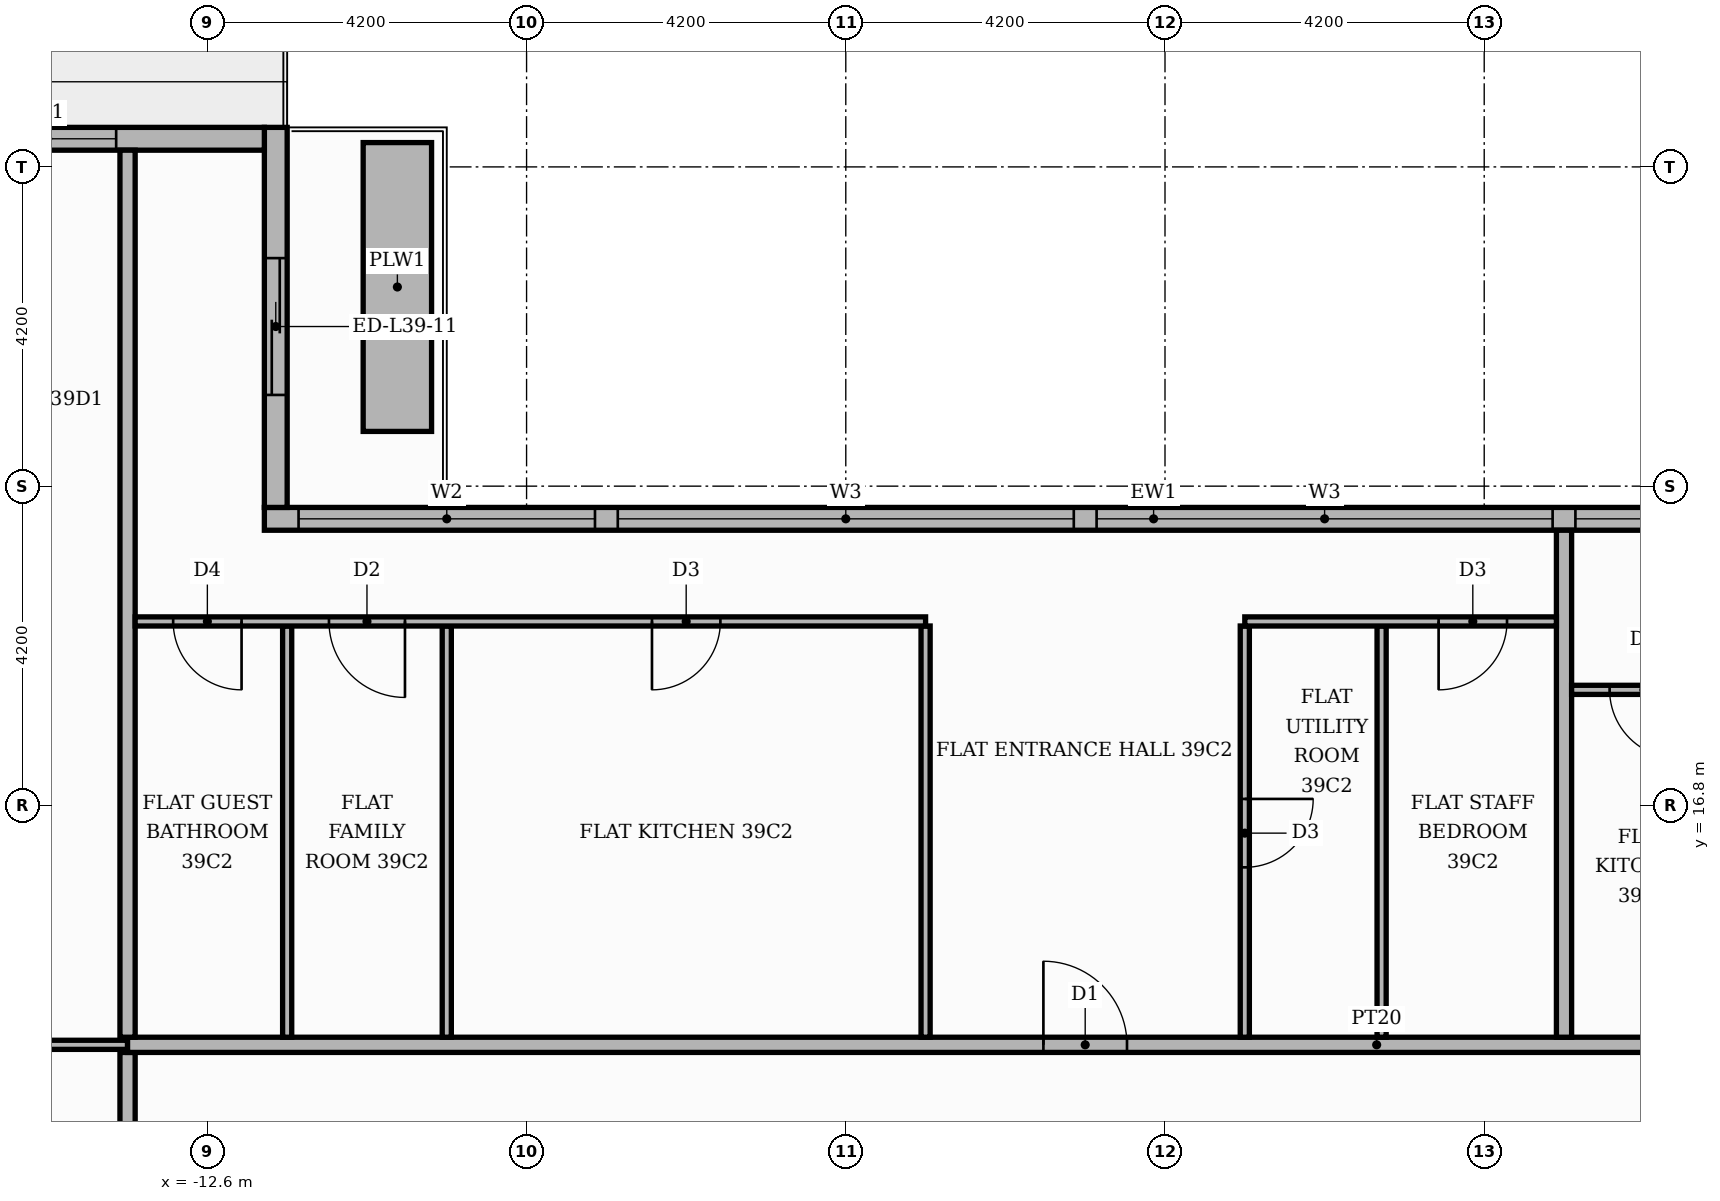
"""IFC4 building model, lengths in metres.
Left out: names, types, materials, properties, quantities, classifications, styles, units other than length and angle.
Written with IfcOpenShell. Run it as: python <this file> out.ifc"""

import sys

from ifc_helpers import new_model, si_unit, direction, frame, frame_2d, origin, place, context, subcontext, project, spatial, rectangle, extrude, element, fill, save


model = new_model("IFC4")
c1 = context("Model", 3, precision=1e-05, world=origin(), true_north=direction((0.0, 1.0)))
c2 = subcontext(c1, "Body", "Model", "MODEL_VIEW")
j1 = project(units=[si_unit("LENGTHUNIT", "METRE"), si_unit("PLANEANGLEUNIT", "RADIAN")], contexts=[c1])
p1 = place(None, origin())
s1 = spatial("IfcSite", under=j1, at=p1, CompositionType="ELEMENT")
p2 = place(p1, origin())
s2 = spatial("IfcBuilding", under=s1, at=p2, CompositionType="ELEMENT")
p3 = place(p2, frame((0.0, 0.0, 165.0)))
s3 = spatial("IfcBuildingStorey", under=s2, at=p3, CompositionType="ELEMENT", Elevation=165.0)
p4 = place(p3, frame((11.55, 20.57, 0.0), z_axis=(0.0, 0.0, 1.0), x_axis=(-1.0, 0.0, 0.0)))
e1 = element("IfcWall", 1, at=p4, inside=s3, PredefinedType="STANDARD", context=c2, shape_type="SweptSolid", body=[
    extrude(rectangle(XDim=23.4, YDim=0.3, at=frame_2d((11.7, 0.0))), origin(), (0.0, 0.0, 1.0), 3.48),
])
p5 = place(p4, frame((0.15, 0.0, 0.9)))
e2 = element("IfcOpeningElement", 2, at=p5, cuts=e1, PredefinedType="OPENING", context=c2, shape_type="SweptSolid", body=[
    extrude(rectangle(XDim=6.0, YDim=2.1, at=frame_2d((3.0, 1.05))), frame((0.0, 0.16, 0.0), z_axis=(0.0, -1.0, 0.0), x_axis=(1.0, 0.0, 0.0)), (0.0, 0.0, 1.0), 0.32),
])
p6 = place(p4, frame((6.45, 0.0, 0.9)))
e3 = element("IfcOpeningElement", 3, at=p6, cuts=e1, PredefinedType="OPENING", context=c2, shape_type="SweptSolid", body=[
    extrude(rectangle(XDim=6.0, YDim=2.1, at=frame_2d((3.0, 1.05))), frame((0.0, 0.16, 0.0), z_axis=(0.0, -1.0, 0.0), x_axis=(1.0, 0.0, 0.0)), (0.0, 0.0, 1.0), 0.32),
])
p7 = place(p4, frame((12.75, 0.0, 0.9)))
e4 = element("IfcOpeningElement", 4, at=p7, cuts=e1, PredefinedType="OPENING", context=c2, shape_type="SweptSolid", body=[
    extrude(rectangle(XDim=6.0, YDim=2.1, at=frame_2d((3.0, 1.05))), frame((0.0, 0.16, 0.0), z_axis=(0.0, -1.0, 0.0), x_axis=(1.0, 0.0, 0.0)), (0.0, 0.0, 1.0), 0.32),
])
p8 = place(p4, frame((19.05, 0.0, 0.9)))
e5 = element("IfcOpeningElement", 5, at=p8, cuts=e1, PredefinedType="OPENING", context=c2, shape_type="SweptSolid", body=[
    extrude(rectangle(XDim=3.9, YDim=2.1, at=frame_2d((1.95, 1.05))), frame((0.0, 0.16, 0.0), z_axis=(0.0, -1.0, 0.0), x_axis=(1.0, 0.0, 0.0)), (0.0, 0.0, 1.0), 0.32),
])
p9 = place(p3, frame((-11.7, 20.72, 0.0), z_axis=(0.0, 0.0, 1.0), x_axis=(0.0, 1.0, 0.0)))
e6 = element("IfcWall", 6, at=p9, inside=s3, PredefinedType="STANDARD", context=c2, shape_type="SweptSolid", body=[
    extrude(rectangle(XDim=5.0, YDim=0.3, at=frame_2d((2.5, 0.0))), origin(), (0.0, 0.0, 1.0), 3.48),
])
p10 = place(p9, frame((1.48, 0.0, 0.0)))
e7 = element("IfcOpeningElement", 7, at=p10, cuts=e6, PredefinedType="OPENING", context=c2, shape_type="SweptSolid", body=[
    extrude(rectangle(XDim=1.8, YDim=2.4, at=frame_2d((0.9, 1.2))), frame((0.0, 0.16, 0.0), z_axis=(0.0, -1.0, 0.0), x_axis=(1.0, 0.0, 0.0)), (0.0, 0.0, 1.0), 0.32),
])
p11 = place(p3, frame((-11.85, 25.57, 0.0), z_axis=(0.0, 0.0, 1.0), x_axis=(-1.0, 0.0, 0.0)))
e8 = element("IfcWall", 8, at=p11, inside=s3, PredefinedType="STANDARD", context=c2, shape_type="SweptSolid", body=[
    extrude(rectangle(XDim=4.35, YDim=0.3, at=frame_2d((2.175, 0.0))), origin(), (0.0, 0.0, 1.0), 3.48),
])
p12 = place(p11, frame((1.95, 0.0, 0.9)))
e9 = element("IfcOpeningElement", 9, at=p12, cuts=e8, PredefinedType="OPENING", context=c2, shape_type="SweptSolid", body=[
    extrude(rectangle(XDim=1.8, YDim=2.1, at=frame_2d((0.9, 1.05))), frame((0.0, 0.16, 0.0), z_axis=(0.0, -1.0, 0.0), x_axis=(1.0, 0.0, 0.0)), (0.0, 0.0, 1.0), 0.32),
])
p13 = place(p3, frame((-10.1, 21.72, 0.0), z_axis=(0.0, 0.0, 1.0), x_axis=(0.0, 1.0, 0.0)))
e10 = element("IfcWall", 10, at=p13, inside=s3, PredefinedType="MOVABLE", context=c2, shape_type="SweptSolid", body=[
    extrude(rectangle(XDim=3.8, YDim=0.9, at=frame_2d((1.9, 0.0))), origin(), (0.0, 0.0, 1.0), 0.6),
])
p14 = place(p3, frame((-13.65, 11.1, 0.0), z_axis=(0.0, 0.0, 1.0), x_axis=(0.0, 1.0, 0.0)))
e11 = element("IfcWall", 11, at=p14, inside=s3, PredefinedType="PARTITIONING", context=c2, shape_type="SweptSolid", body=[
    extrude(rectangle(XDim=2.45, YDim=0.2, at=frame_2d((1.225, 0.0))), origin(), (0.0, 0.0, 1.0), 3.48),
])
p15 = place(p3, frame((-19.82, 13.65, 0.0), z_axis=(0.0, 0.0, 1.0), x_axis=(1.0, 0.0, 0.0)))
e12 = element("IfcWall", 12, at=p15, inside=s3, PredefinedType="PARTITIONING", context=c2, shape_type="SweptSolid", body=[
    extrude(rectangle(XDim=6.17, YDim=0.12, at=frame_2d((3.085, 0.0))), origin(), (0.0, 0.0, 1.0), 3.48),
])
p16 = place(p15, frame((2.635, 0.0, 0.0)))
e13 = element("IfcOpeningElement", 13, at=p16, cuts=e12, PredefinedType="OPENING", context=c2, shape_type="SweptSolid", body=[
    extrude(rectangle(XDim=0.9, YDim=2.1, at=frame_2d((0.45, 1.05))), frame((0.0, 0.07, 0.0), z_axis=(0.0, -1.0, 0.0), x_axis=(1.0, 0.0, 0.0)), (0.0, 0.0, 1.0), 0.14),
])
p17 = place(p3, frame((-13.65, 13.65, 0.0), z_axis=(0.0, 0.0, 1.0), x_axis=(1.0, 0.0, 0.0)))
e14 = element("IfcWall", 14, at=p17, inside=s3, PredefinedType="PARTITIONING", context=c2, shape_type="SweptSolid", body=[
    extrude(rectangle(XDim=32.87, YDim=0.2, at=frame_2d((16.435, 0.0))), origin(), (0.0, 0.0, 1.0), 3.48),
])
p18 = place(p17, frame((24.65, 0.0, 0.0)))
e15 = element("IfcOpeningElement", 15, at=p18, cuts=e14, PredefinedType="OPENING", context=c2, shape_type="SweptSolid", body=[
    extrude(rectangle(XDim=1.1, YDim=2.4, at=frame_2d((0.55, 1.2))), frame((0.0, 0.11, 0.0), z_axis=(0.0, -1.0, 0.0), x_axis=(1.0, 0.0, 0.0)), (0.0, 0.0, 1.0), 0.22),
])
p19 = place(p17, frame((12.05, 0.0, 0.0)))
e16 = element("IfcOpeningElement", 16, at=p19, cuts=e14, PredefinedType="OPENING", context=c2, shape_type="SweptSolid", body=[
    extrude(rectangle(XDim=1.1, YDim=2.4, at=frame_2d((0.55, 1.2))), frame((0.0, 0.11, 0.0), z_axis=(0.0, -1.0, 0.0), x_axis=(1.0, 0.0, 0.0)), (0.0, 0.0, 1.0), 0.22),
])
p20 = place(p3, frame((-13.65, 13.75, 0.0), z_axis=(0.0, 0.0, 1.0), x_axis=(0.0, 1.0, 0.0)))
e17 = element("IfcWall", 17, at=p20, inside=s3, PredefinedType="PARTITIONING", context=c2, shape_type="SweptSolid", body=[
    extrude(rectangle(XDim=11.67, YDim=0.2, at=frame_2d((5.835, 0.0))), origin(), (0.0, 0.0, 1.0), 3.48),
])
for number, where, z_axis, x_axis in (
    (18, (-11.55, 13.75, 0.0), (0.0, 0.0, 1.0), (0.0, 1.0, 0.0)),
    (19, (-9.45, 13.75, 0.0), (0.0, 0.0, 1.0), (0.0, 1.0, 0.0)),
    (20, (-3.15, 13.75, 0.0), (0.0, 0.0, 1.0), (0.0, 1.0, 0.0)),
):
    element("IfcWall", number, at=place(p3, frame(where, z_axis=z_axis, x_axis=x_axis)), inside=s3, PredefinedType="PARTITIONING", context=c2, shape_type="SweptSolid", body=[
        extrude(rectangle(XDim=5.41, YDim=0.12, at=frame_2d((2.705, 0.0))), origin(), (0.0, 0.0, 1.0), 3.48),
    ])
p21 = place(p3, frame((1.05, 13.75, 0.0), z_axis=(0.0, 0.0, 1.0), x_axis=(0.0, 1.0, 0.0)))
e21 = element("IfcWall", 21, at=p21, inside=s3, PredefinedType="PARTITIONING", context=c2, shape_type="SweptSolid", body=[
    extrude(rectangle(XDim=5.41, YDim=0.12, at=frame_2d((2.705, 0.0))), origin(), (0.0, 0.0, 1.0), 3.48),
])
p22 = place(p21, frame((2.235, 0.0, 0.0)))
e22 = element("IfcOpeningElement", 22, at=p22, cuts=e21, PredefinedType="OPENING", context=c2, shape_type="SweptSolid", body=[
    extrude(rectangle(XDim=0.9, YDim=2.1, at=frame_2d((0.45, 1.05))), frame((0.0, 0.07, 0.0), z_axis=(0.0, -1.0, 0.0), x_axis=(1.0, 0.0, 0.0)), (0.0, 0.0, 1.0), 0.14),
])
p23 = place(p3, frame((2.85, 13.75, 0.0), z_axis=(0.0, 0.0, 1.0), x_axis=(0.0, 1.0, 0.0)))
e23 = element("IfcWall", 23, at=p23, inside=s3, PredefinedType="PARTITIONING", context=c2, shape_type="SweptSolid", body=[
    extrude(rectangle(XDim=5.41, YDim=0.12, at=frame_2d((2.705, 0.0))), origin(), (0.0, 0.0, 1.0), 3.48),
])
p24 = place(p3, frame((5.25, 13.75, 0.0), z_axis=(0.0, 0.0, 1.0), x_axis=(0.0, 1.0, 0.0)))
e24 = element("IfcWall", 24, at=p24, inside=s3, PredefinedType="PARTITIONING", context=c2, shape_type="SweptSolid", body=[
    extrude(rectangle(XDim=6.67, YDim=0.2, at=frame_2d((3.335, 0.0))), origin(), (0.0, 0.0, 1.0), 3.48),
])
p25 = place(p3, frame((5.35, 18.32, 0.0), z_axis=(0.0, 0.0, 1.0), x_axis=(1.0, 0.0, 0.0)))
e25 = element("IfcWall", 25, at=p25, inside=s3, PredefinedType="PARTITIONING", context=c2, shape_type="SweptSolid", body=[
    extrude(rectangle(XDim=4.1, YDim=0.12, at=frame_2d((2.05, 0.0))), origin(), (0.0, 0.0, 1.0), 3.48),
])
p26 = place(p25, frame((0.5, 0.0, 0.0)))
e26 = element("IfcOpeningElement", 26, at=p26, cuts=e25, PredefinedType="OPENING", context=c2, shape_type="SweptSolid", body=[
    extrude(rectangle(XDim=0.9, YDim=2.1, at=frame_2d((0.45, 1.05))), frame((0.0, 0.07, 0.0), z_axis=(0.0, -1.0, 0.0), x_axis=(1.0, 0.0, 0.0)), (0.0, 0.0, 1.0), 0.14),
])
p27 = place(p3, frame((-13.55, 19.22, 0.0), z_axis=(0.0, 0.0, 1.0), x_axis=(1.0, 0.0, 0.0)))
e27 = element("IfcWall", 27, at=p27, inside=s3, PredefinedType="PARTITIONING", context=c2, shape_type="SweptSolid", body=[
    extrude(rectangle(XDim=10.4, YDim=0.12, at=frame_2d((5.2, 0.0))), origin(), (0.0, 0.0, 1.0), 3.48),
])
p28 = place(p27, frame((6.8, 0.0, 0.0)))
e28 = element("IfcOpeningElement", 28, at=p28, cuts=e27, PredefinedType="OPENING", context=c2, shape_type="SweptSolid", body=[
    extrude(rectangle(XDim=0.9, YDim=2.1, at=frame_2d((0.45, 1.05))), frame((0.0, 0.07, 0.0), z_axis=(0.0, -1.0, 0.0), x_axis=(1.0, 0.0, 0.0)), (0.0, 0.0, 1.0), 0.14),
])
p29 = place(p27, frame((2.55, 0.0, 0.0)))
e29 = element("IfcOpeningElement", 29, at=p29, cuts=e27, PredefinedType="OPENING", context=c2, shape_type="SweptSolid", body=[
    extrude(rectangle(XDim=1.0, YDim=2.1, at=frame_2d((0.5, 1.05))), frame((0.0, 0.07, 0.0), z_axis=(0.0, -1.0, 0.0), x_axis=(1.0, 0.0, 0.0)), (0.0, 0.0, 1.0), 0.14),
])
p30 = place(p27, frame((0.5, 0.0, 0.0)))
e30 = element("IfcOpeningElement", 30, at=p30, cuts=e27, PredefinedType="OPENING", context=c2, shape_type="SweptSolid", body=[
    extrude(rectangle(XDim=0.9, YDim=2.1, at=frame_2d((0.45, 1.05))), frame((0.0, 0.07, 0.0), z_axis=(0.0, -1.0, 0.0), x_axis=(1.0, 0.0, 0.0)), (0.0, 0.0, 1.0), 0.14),
])
p31 = place(p3, frame((1.05, 19.22, 0.0), z_axis=(0.0, 0.0, 1.0), x_axis=(1.0, 0.0, 0.0)))
e31 = element("IfcWall", 31, at=p31, inside=s3, PredefinedType="PARTITIONING", context=c2, shape_type="SweptSolid", body=[
    extrude(rectangle(XDim=4.1, YDim=0.12, at=frame_2d((2.05, 0.0))), origin(), (0.0, 0.0, 1.0), 3.48),
])
p32 = place(p31, frame((2.55, 0.0, 0.0)))
e32 = element("IfcOpeningElement", 32, at=p32, cuts=e31, PredefinedType="OPENING", context=c2, shape_type="SweptSolid", body=[
    extrude(rectangle(XDim=0.9, YDim=2.1, at=frame_2d((0.45, 1.05))), frame((0.0, 0.07, 0.0), z_axis=(0.0, -1.0, 0.0), x_axis=(1.0, 0.0, 0.0)), (0.0, 0.0, 1.0), 0.14),
])
p33 = place(p5, origin())
e33 = element("IfcWindow", 33, at=p33, inside=s3, PartitioningType="SINGLE_PANEL", PredefinedType="WINDOW", context=c2, shape_type="SweptSolid", body=[
    extrude(rectangle(XDim=6.0, YDim=2.1, at=frame_2d((3.0, 1.05))), frame((0.0, 0.03, 0.0), z_axis=(0.0, -1.0, 0.0), x_axis=(1.0, 0.0, 0.0)), (0.0, 0.0, 1.0), 0.06),
])
fill(e2, e33)
p34 = place(p6, origin())
e34 = element("IfcWindow", 34, at=p34, inside=s3, PartitioningType="SINGLE_PANEL", PredefinedType="WINDOW", context=c2, shape_type="SweptSolid", body=[
    extrude(rectangle(XDim=6.0, YDim=2.1, at=frame_2d((3.0, 1.05))), frame((0.0, 0.03, 0.0), z_axis=(0.0, -1.0, 0.0), x_axis=(1.0, 0.0, 0.0)), (0.0, 0.0, 1.0), 0.06),
])
fill(e3, e34)
p35 = place(p7, origin())
e35 = element("IfcWindow", 35, at=p35, inside=s3, PartitioningType="SINGLE_PANEL", PredefinedType="WINDOW", context=c2, shape_type="SweptSolid", body=[
    extrude(rectangle(XDim=6.0, YDim=2.1, at=frame_2d((3.0, 1.05))), frame((0.0, 0.03, 0.0), z_axis=(0.0, -1.0, 0.0), x_axis=(1.0, 0.0, 0.0)), (0.0, 0.0, 1.0), 0.06),
])
fill(e4, e35)
p36 = place(p8, origin())
e36 = element("IfcWindow", 36, at=p36, inside=s3, PartitioningType="SINGLE_PANEL", PredefinedType="WINDOW", context=c2, shape_type="SweptSolid", body=[
    extrude(rectangle(XDim=3.9, YDim=2.1, at=frame_2d((1.95, 1.05))), frame((0.0, 0.03, 0.0), z_axis=(0.0, -1.0, 0.0), x_axis=(1.0, 0.0, 0.0)), (0.0, 0.0, 1.0), 0.06),
])
fill(e5, e36)
p37 = place(p10, origin())
e37 = element("IfcDoor", 37, at=p37, inside=s3, OperationType="SLIDING_TO_RIGHT", PredefinedType="DOOR", context=c2, shape_type="SweptSolid", body=[
    extrude(rectangle(XDim=1.8, YDim=2.4, at=frame_2d((0.9, 1.2))), frame((0.0, 0.025, 0.0), z_axis=(0.0, -1.0, 0.0), x_axis=(1.0, 0.0, 0.0)), (0.0, 0.0, 1.0), 0.05),
])
fill(e7, e37)
p38 = place(p12, origin())
e38 = element("IfcWindow", 38, at=p38, inside=s3, PartitioningType="SINGLE_PANEL", PredefinedType="WINDOW", context=c2, shape_type="SweptSolid", body=[
    extrude(rectangle(XDim=1.8, YDim=2.1, at=frame_2d((0.9, 1.05))), frame((0.0, 0.03, 0.0), z_axis=(0.0, -1.0, 0.0), x_axis=(1.0, 0.0, 0.0)), (0.0, 0.0, 1.0), 0.06),
])
fill(e9, e38)
p39 = place(p26, frame((0.9, 0.0, 0.0), z_axis=(0.0, 0.0, 1.0), x_axis=(-1.0, 0.0, 0.0)))
e39 = element("IfcDoor", 39, at=p39, inside=s3, OperationType="SINGLE_SWING_RIGHT", PredefinedType="DOOR", context=c2, shape_type="SweptSolid", body=[
    extrude(rectangle(XDim=0.9, YDim=2.1, at=frame_2d((0.45, 1.05))), frame((0.0, 0.025, 0.0), z_axis=(0.0, -1.0, 0.0), x_axis=(1.0, 0.0, 0.0)), (0.0, 0.0, 1.0), 0.05),
])
fill(e26, e39)
p40 = place(p19, origin())
e40 = element("IfcDoor", 40, at=p40, inside=s3, OperationType="SINGLE_SWING_LEFT", PredefinedType="DOOR", context=c2, shape_type="SweptSolid", body=[
    extrude(rectangle(XDim=1.1, YDim=2.4, at=frame_2d((0.55, 1.2))), frame((0.0, 0.025, 0.0), z_axis=(0.0, -1.0, 0.0), x_axis=(1.0, 0.0, 0.0)), (0.0, 0.0, 1.0), 0.05),
])
fill(e16, e40)
p41 = place(p32, frame((0.9, 0.0, 0.0), z_axis=(0.0, 0.0, 1.0), x_axis=(-1.0, 0.0, 0.0)))
e41 = element("IfcDoor", 41, at=p41, inside=s3, OperationType="SINGLE_SWING_LEFT", PredefinedType="DOOR", context=c2, shape_type="SweptSolid", body=[
    extrude(rectangle(XDim=0.9, YDim=2.1, at=frame_2d((0.45, 1.05))), frame((0.0, 0.025, 0.0), z_axis=(0.0, -1.0, 0.0), x_axis=(1.0, 0.0, 0.0)), (0.0, 0.0, 1.0), 0.05),
])
fill(e32, e41)
p42 = place(p22, frame((0.9, 0.0, 0.0), z_axis=(0.0, 0.0, 1.0), x_axis=(-1.0, 0.0, 0.0)))
e42 = element("IfcDoor", 42, at=p42, inside=s3, OperationType="SINGLE_SWING_RIGHT", PredefinedType="DOOR", context=c2, shape_type="SweptSolid", body=[
    extrude(rectangle(XDim=0.9, YDim=2.1, at=frame_2d((0.45, 1.05))), frame((0.0, 0.025, 0.0), z_axis=(0.0, -1.0, 0.0), x_axis=(1.0, 0.0, 0.0)), (0.0, 0.0, 1.0), 0.05),
])
fill(e22, e42)
p43 = place(p28, frame((0.9, 0.0, 0.0), z_axis=(0.0, 0.0, 1.0), x_axis=(-1.0, 0.0, 0.0)))
e43 = element("IfcDoor", 43, at=p43, inside=s3, OperationType="SINGLE_SWING_LEFT", PredefinedType="DOOR", context=c2, shape_type="SweptSolid", body=[
    extrude(rectangle(XDim=0.9, YDim=2.1, at=frame_2d((0.45, 1.05))), frame((0.0, 0.025, 0.0), z_axis=(0.0, -1.0, 0.0), x_axis=(1.0, 0.0, 0.0)), (0.0, 0.0, 1.0), 0.05),
])
fill(e28, e43)
p44 = place(p29, frame((1.0, 0.0, 0.0), z_axis=(0.0, 0.0, 1.0), x_axis=(-1.0, 0.0, 0.0)))
e44 = element("IfcDoor", 44, at=p44, inside=s3, OperationType="SINGLE_SWING_RIGHT", PredefinedType="DOOR", context=c2, shape_type="SweptSolid", body=[
    extrude(rectangle(XDim=1.0, YDim=2.1, at=frame_2d((0.5, 1.05))), frame((0.0, 0.025, 0.0), z_axis=(0.0, -1.0, 0.0), x_axis=(1.0, 0.0, 0.0)), (0.0, 0.0, 1.0), 0.05),
])
fill(e29, e44)
p45 = place(p30, frame((0.9, 0.0, 0.0), z_axis=(0.0, 0.0, 1.0), x_axis=(-1.0, 0.0, 0.0)))
e45 = element("IfcDoor", 45, at=p45, inside=s3, OperationType="SINGLE_SWING_RIGHT", PredefinedType="DOOR", context=c2, shape_type="SweptSolid", body=[
    extrude(rectangle(XDim=0.9, YDim=2.1, at=frame_2d((0.45, 1.05))), frame((0.0, 0.025, 0.0), z_axis=(0.0, -1.0, 0.0), x_axis=(1.0, 0.0, 0.0)), (0.0, 0.0, 1.0), 0.05),
])
fill(e30, e45)
save(model, sys.argv[1])
